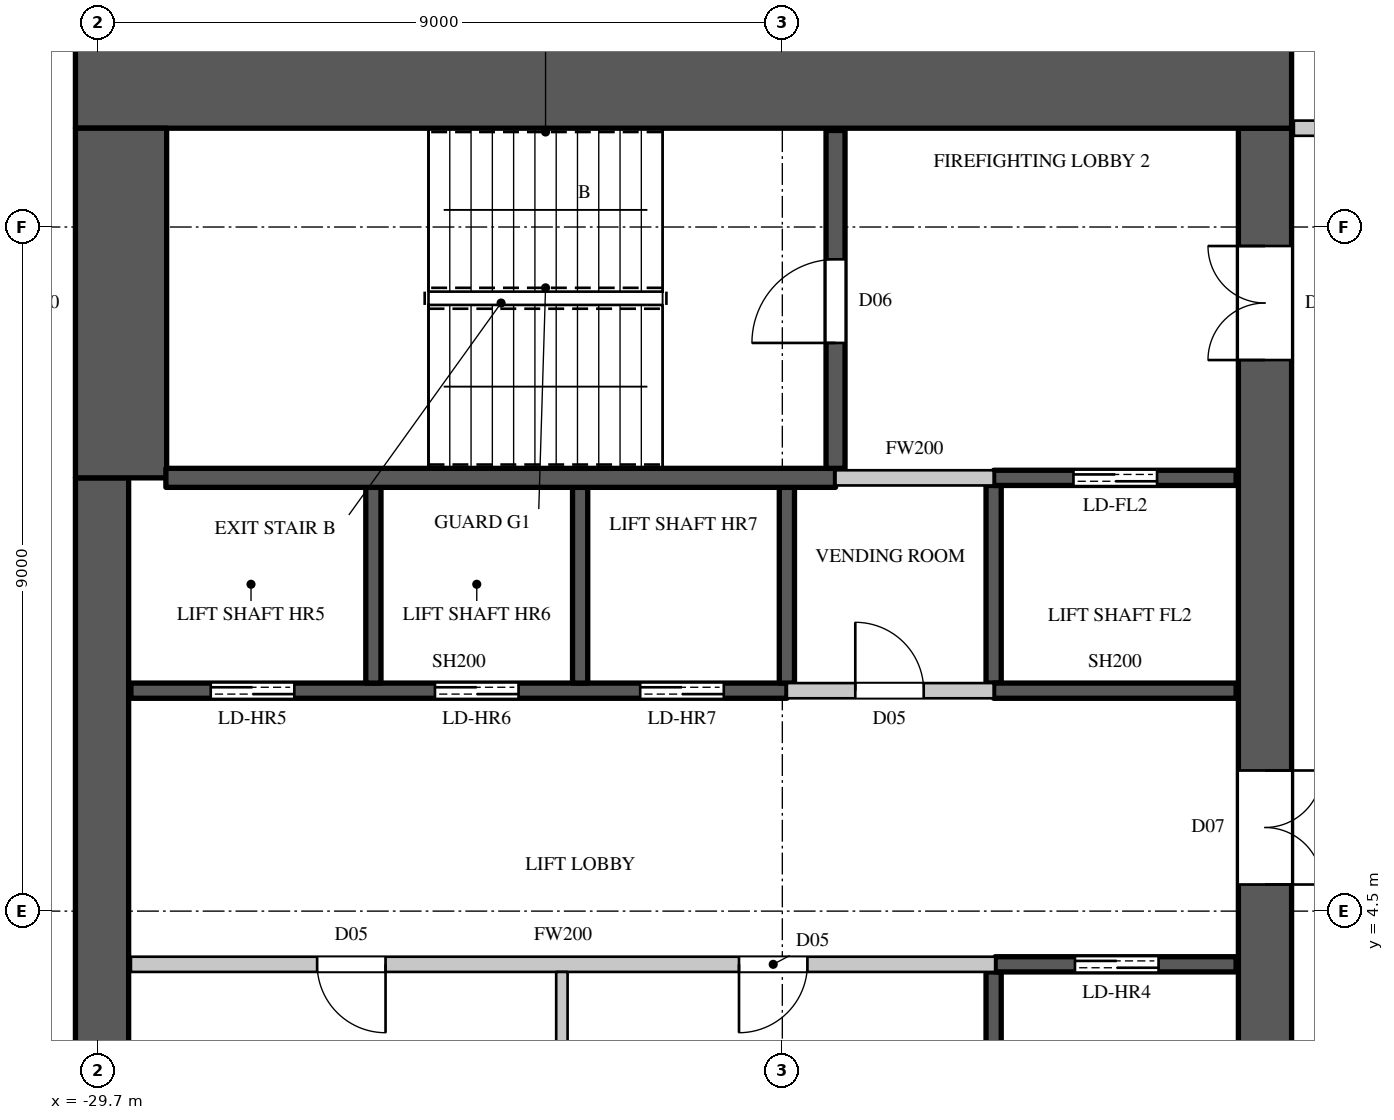
"""IFC4 building model, lengths in metres.
Left out: names, types, materials, properties, quantities, classifications, styles, units other than length and angle.
Written with IfcOpenShell. Run it as: python <this file> out.ifc"""

import sys

from ifc_helpers import new_model, si_unit, direction, frame, frame_2d, origin, place, context, subcontext, project, spatial, rectangle, extrude, element, fill, save


model = new_model("IFC4")
c1 = context("Model", 3, precision=1e-05, world=origin(), true_north=direction((0.0, 1.0)))
c2 = subcontext(c1, "Body", "Model", "MODEL_VIEW")
j1 = project(units=[si_unit("LENGTHUNIT", "METRE"), si_unit("PLANEANGLEUNIT", "RADIAN")], contexts=[c1])
p1 = place(None, origin())
s1 = spatial("IfcSite", under=j1, at=p1, CompositionType="ELEMENT")
p2 = place(p1, origin())
s2 = spatial("IfcBuilding", under=s1, at=p2, CompositionType="ELEMENT")
p3 = place(p2, frame((0.0, 0.0, 309.0)))
s3 = spatial("IfcBuildingStorey", under=s2, at=p3, CompositionType="ELEMENT", Elevation=309.0)
p4 = place(p3, frame((-30.0, 15.4, 0.0), z_axis=(0.0, 0.0, 1.0), x_axis=(1.0, 0.0, 0.0)))
e1 = element("IfcWall", 1, at=p4, inside=s3, PredefinedType="SHEAR", context=c2, shape_type="SweptSolid", body=[
    extrude(rectangle(XDim=16.0, YDim=1.2, at=frame_2d((8.0, 0.0))), origin(), (0.0, 0.0, 1.0), 4.1),
])
p5 = place(p3, frame((-14.35, -14.8, 0.0), z_axis=(0.0, 0.0, 1.0), x_axis=(0.0, 1.0, 0.0)))
e2 = element("IfcWall", 2, at=p5, inside=s3, PredefinedType="SHEAR", context=c2, shape_type="SweptSolid", body=[
    extrude(rectangle(XDim=29.6, YDim=0.7, at=frame_2d((14.8, 0.0))), origin(), (0.0, 0.0, 1.0), 4.1),
])
p6 = place(p5, frame((1.55, 0.0, 0.0)))
e3 = element("IfcOpeningElement", 3, at=p6, cuts=e2, PredefinedType="OPENING", context=c2, shape_type="SweptSolid", body=[
    extrude(rectangle(XDim=1.5, YDim=2.4, at=frame_2d((0.75, 1.2))), frame((0.0, 0.36, 0.0), z_axis=(0.0, -1.0, 0.0), x_axis=(1.0, 0.0, 0.0)), (0.0, 0.0, 1.0), 0.72),
])
p7 = place(p5, frame((26.55, 0.0, 0.0)))
e4 = element("IfcOpeningElement", 4, at=p7, cuts=e2, PredefinedType="OPENING", context=c2, shape_type="SweptSolid", body=[
    extrude(rectangle(XDim=1.5, YDim=2.4, at=frame_2d((0.75, 1.2))), frame((0.0, 0.36, 0.0), z_axis=(0.0, -1.0, 0.0), x_axis=(1.0, 0.0, 0.0)), (0.0, 0.0, 1.0), 0.72),
])
p8 = place(p5, frame((8.45, 0.0, 0.0)))
e5 = element("IfcOpeningElement", 5, at=p8, cuts=e2, PredefinedType="OPENING", context=c2, shape_type="SweptSolid", body=[
    extrude(rectangle(XDim=1.5, YDim=2.4, at=frame_2d((0.75, 1.2))), frame((0.0, 0.36, 0.0), z_axis=(0.0, -1.0, 0.0), x_axis=(1.0, 0.0, 0.0)), (0.0, 0.0, 1.0), 0.72),
])
p9 = place(p5, frame((19.65, 0.0, 0.0)))
e6 = element("IfcOpeningElement", 6, at=p9, cuts=e2, PredefinedType="OPENING", context=c2, shape_type="SweptSolid", body=[
    extrude(rectangle(XDim=1.5, YDim=2.4, at=frame_2d((0.75, 1.2))), frame((0.0, 0.36, 0.0), z_axis=(0.0, -1.0, 0.0), x_axis=(1.0, 0.0, 0.0)), (0.0, 0.0, 1.0), 0.72),
])
p10 = place(p5, frame((14.5, 0.0, 0.0)))
e7 = element("IfcOpeningElement", 7, at=p10, cuts=e2, PredefinedType="OPENING", context=c2, shape_type="SweptSolid", body=[
    extrude(rectangle(XDim=0.6, YDim=2.0, at=frame_2d((0.3, 1.0))), frame((0.0, 0.36, 0.0), z_axis=(0.0, -1.0, 0.0), x_axis=(1.0, 0.0, 0.0)), (0.0, 0.0, 1.0), 0.72),
])
p11 = place(p3, frame((-29.65, -10.2, 0.0), z_axis=(0.0, 0.0, 1.0), x_axis=(0.0, 1.0, 0.0)))
e8 = element("IfcWall", 8, at=p11, inside=s3, PredefinedType="SHEAR", context=c2, shape_type="SweptSolid", body=[
    extrude(rectangle(XDim=20.4, YDim=0.7, at=frame_2d((10.2, 0.0))), origin(), (0.0, 0.0, 1.0), 4.1),
])
p12 = place(p3, frame((-29.4, 10.2, 0.0), z_axis=(0.0, 0.0, 1.0), x_axis=(0.0, 1.0, 0.0)))
e9 = element("IfcWall", 9, at=p12, inside=s3, PredefinedType="SHEAR", context=c2, shape_type="SweptSolid", body=[
    extrude(rectangle(XDim=4.6, YDim=1.2, at=frame_2d((2.3, 0.0))), origin(), (0.0, 0.0, 1.0), 4.1),
])
p13 = place(p3, frame((-29.27, 3.8, 0.0), z_axis=(0.0, 0.0, 1.0), x_axis=(1.0, 0.0, 0.0)))
e10 = element("IfcWall", 10, at=p13, inside=s3, PredefinedType="PARTITIONING", context=c2, shape_type="SweptSolid", body=[
    extrude(rectangle(XDim=11.37, YDim=0.2, at=frame_2d((5.685, 0.0))), origin(), (0.0, 0.0, 1.0), 3.8),
])
p14 = place(p13, frame((2.45, 0.0, 0.0)))
e11 = element("IfcOpeningElement", 11, at=p14, cuts=e10, PredefinedType="OPENING", context=c2, shape_type="SweptSolid", body=[
    extrude(rectangle(XDim=0.9, YDim=2.2, at=frame_2d((0.45, 1.1))), frame((0.0, 0.11, 0.0), z_axis=(0.0, -1.0, 0.0), x_axis=(1.0, 0.0, 0.0)), (0.0, 0.0, 1.0), 0.22),
])
p15 = place(p13, frame((8.0, 0.0, 0.0)))
e12 = element("IfcOpeningElement", 12, at=p15, cuts=e10, PredefinedType="OPENING", context=c2, shape_type="SweptSolid", body=[
    extrude(rectangle(XDim=0.9, YDim=2.2, at=frame_2d((0.45, 1.1))), frame((0.0, 0.11, 0.0), z_axis=(0.0, -1.0, 0.0), x_axis=(1.0, 0.0, 0.0)), (0.0, 0.0, 1.0), 0.22),
])
p16 = place(p3, frame((-20.64, 7.4, 0.0), z_axis=(0.0, 0.0, 1.0), x_axis=(1.0, 0.0, 0.0)))
e13 = element("IfcWall", 13, at=p16, inside=s3, PredefinedType="PARTITIONING", context=c2, shape_type="SweptSolid", body=[
    extrude(rectangle(XDim=2.72, YDim=0.2, at=frame_2d((1.36, 0.0))), origin(), (0.0, 0.0, 1.0), 3.8),
])
p17 = place(p16, frame((0.9, 0.0, 0.0)))
e14 = element("IfcOpeningElement", 14, at=p17, cuts=e13, PredefinedType="OPENING", context=c2, shape_type="SweptSolid", body=[
    extrude(rectangle(XDim=0.9, YDim=2.2, at=frame_2d((0.45, 1.1))), frame((0.0, 0.11, 0.0), z_axis=(0.0, -1.0, 0.0), x_axis=(1.0, 0.0, 0.0)), (0.0, 0.0, 1.0), 0.22),
])
p18 = place(p3, frame((-20.0, 10.2, 0.0), z_axis=(0.0, 0.0, 1.0), x_axis=(1.0, 0.0, 0.0)))
e15 = element("IfcWall", 15, at=p18, inside=s3, PredefinedType="PARTITIONING", context=c2, shape_type="SweptSolid", body=[
    extrude(rectangle(XDim=2.08, YDim=0.2, at=frame_2d((1.04, 0.0))), origin(), (0.0, 0.0, 1.0), 3.8),
])
p19 = place(p3, frame((-13.97, 14.8, 0.0), z_axis=(0.0, 0.0, 1.0), x_axis=(1.0, 0.0, 0.0)))
e16 = element("IfcWall", 16, at=p19, inside=s3, PredefinedType="PARTITIONING", context=c2, shape_type="SweptSolid", body=[
    extrude(rectangle(XDim=3.07, YDim=0.2, at=frame_2d((1.535, 0.0))), origin(), (0.0, 0.0, 1.0), 3.8),
])
p20 = place(p3, frame((-23.6, 1.1, 0.0), z_axis=(0.0, 0.0, 1.0), x_axis=(0.0, 1.0, 0.0)))
e17 = element("IfcWall", 17, at=p20, inside=s3, PredefinedType="PARTITIONING", context=c2, shape_type="SweptSolid", body=[
    extrude(rectangle(XDim=2.6, YDim=0.15, at=frame_2d((1.3, 0.0))), origin(), (0.0, 0.0, 1.0), 3.8),
])
p21 = place(p3, frame((-29.27, 7.4, 0.0), z_axis=(0.0, 0.0, 1.0), x_axis=(1.0, 0.0, 0.0)))
e18 = element("IfcWall", 18, at=p21, inside=s3, PredefinedType="SHEAR", context=c2, shape_type="SweptSolid", body=[
    extrude(rectangle(XDim=8.63, YDim=0.2, at=frame_2d((4.315, 0.0))), origin(), (0.0, 0.0, 1.0), 3.8),
])
p22 = place(p21, frame((1.05, 0.0, 0.0)))
e19 = element("IfcOpeningElement", 19, at=p22, cuts=e18, PredefinedType="OPENING", context=c2, shape_type="SweptSolid", body=[
    extrude(rectangle(XDim=1.1, YDim=2.2, at=frame_2d((0.55, 1.1))), frame((0.0, 0.11, 0.0), z_axis=(0.0, -1.0, 0.0), x_axis=(1.0, 0.0, 0.0)), (0.0, 0.0, 1.0), 0.22),
])
p23 = place(p21, frame((4.0, 0.0, 0.0)))
e20 = element("IfcOpeningElement", 20, at=p23, cuts=e18, PredefinedType="OPENING", context=c2, shape_type="SweptSolid", body=[
    extrude(rectangle(XDim=1.1, YDim=2.2, at=frame_2d((0.55, 1.1))), frame((0.0, 0.11, 0.0), z_axis=(0.0, -1.0, 0.0), x_axis=(1.0, 0.0, 0.0)), (0.0, 0.0, 1.0), 0.22),
])
p24 = place(p21, frame((6.7, 0.0, 0.0)))
e21 = element("IfcOpeningElement", 21, at=p24, cuts=e18, PredefinedType="OPENING", context=c2, shape_type="SweptSolid", body=[
    extrude(rectangle(XDim=1.1, YDim=2.2, at=frame_2d((0.55, 1.1))), frame((0.0, 0.11, 0.0), z_axis=(0.0, -1.0, 0.0), x_axis=(1.0, 0.0, 0.0)), (0.0, 0.0, 1.0), 0.22),
])
for number, where, z_axis, x_axis in (
    (22, (-26.08, 7.5, 0.0), (0.0, 0.0, 1.0), (0.0, 1.0, 0.0)),
    (23, (-23.36, 7.5, 0.0), (0.0, 0.0, 1.0), (0.0, 1.0, 0.0)),
):
    element("IfcWall", number, at=place(p3, frame(where, z_axis=z_axis, x_axis=x_axis)), inside=s3, PredefinedType="SHEAR", context=c2, shape_type="SweptSolid", body=[
        extrude(rectangle(XDim=2.575, YDim=0.2, at=frame_2d((1.288, 0.0))), origin(), (0.0, 0.0, 1.0), 4.1),
    ])
p25 = place(p3, frame((-20.64, 7.5, 0.0), z_axis=(0.0, 0.0, 1.0), x_axis=(0.0, 1.0, 0.0)))
e24 = element("IfcWall", 24, at=p25, inside=s3, PredefinedType="SHEAR", context=c2, shape_type="SweptSolid", body=[
    extrude(rectangle(XDim=2.575, YDim=0.2, at=frame_2d((1.288, 0.0))), origin(), (0.0, 0.0, 1.0), 3.8),
])
p26 = place(p3, frame((-17.92, 1.1, 0.0), z_axis=(0.0, 0.0, 1.0), x_axis=(0.0, 1.0, 0.0)))
e25 = element("IfcWall", 25, at=p26, inside=s3, PredefinedType="SHEAR", context=c2, shape_type="SweptSolid", body=[
    extrude(rectangle(XDim=2.6, YDim=0.2, at=frame_2d((1.3, 0.0))), origin(), (0.0, 0.0, 1.0), 3.8),
])
p27 = place(p3, frame((-17.9, 3.8, 0.0), z_axis=(0.0, 0.0, 1.0), x_axis=(1.0, 0.0, 0.0)))
e26 = element("IfcWall", 26, at=p27, inside=s3, PredefinedType="SHEAR", context=c2, shape_type="SweptSolid", body=[
    extrude(rectangle(XDim=3.17, YDim=0.2, at=frame_2d((1.585, 0.0))), origin(), (0.0, 0.0, 1.0), 3.8),
])
p28 = place(p27, frame((1.05, 0.0, 0.0)))
e27 = element("IfcOpeningElement", 27, at=p28, cuts=e26, PredefinedType="OPENING", context=c2, shape_type="SweptSolid", body=[
    extrude(rectangle(XDim=1.1, YDim=2.2, at=frame_2d((0.55, 1.1))), frame((0.0, 0.11, 0.0), z_axis=(0.0, -1.0, 0.0), x_axis=(1.0, 0.0, 0.0)), (0.0, 0.0, 1.0), 0.22),
])
p29 = place(p3, frame((-17.92, 7.5, 0.0), z_axis=(0.0, 0.0, 1.0), x_axis=(0.0, 1.0, 0.0)))
e28 = element("IfcWall", 28, at=p29, inside=s3, PredefinedType="SHEAR", context=c2, shape_type="SweptSolid", body=[
    extrude(rectangle(XDim=2.6, YDim=0.2, at=frame_2d((1.3, 0.0))), origin(), (0.0, 0.0, 1.0), 3.8),
])
p30 = place(p3, frame((-17.92, 7.4, 0.0), z_axis=(0.0, 0.0, 1.0), x_axis=(1.0, 0.0, 0.0)))
e29 = element("IfcWall", 29, at=p30, inside=s3, PredefinedType="SHEAR", context=c2, shape_type="SweptSolid", body=[
    extrude(rectangle(XDim=3.19, YDim=0.2, at=frame_2d((1.595, 0.0))), origin(), (0.0, 0.0, 1.0), 3.8),
])
p31 = place(p3, frame((-17.92, 10.2, 0.0), z_axis=(0.0, 0.0, 1.0), x_axis=(1.0, 0.0, 0.0)))
e30 = element("IfcWall", 30, at=p31, inside=s3, PredefinedType="SHEAR", context=c2, shape_type="SweptSolid", body=[
    extrude(rectangle(XDim=3.19, YDim=0.2, at=frame_2d((1.595, 0.0))), origin(), (0.0, 0.0, 1.0), 3.8),
])
p32 = place(p31, frame((1.05, 0.0, 0.0)))
e31 = element("IfcOpeningElement", 31, at=p32, cuts=e30, PredefinedType="OPENING", context=c2, shape_type="SweptSolid", body=[
    extrude(rectangle(XDim=1.1, YDim=2.2, at=frame_2d((0.55, 1.1))), frame((0.0, 0.11, 0.0), z_axis=(0.0, -1.0, 0.0), x_axis=(1.0, 0.0, 0.0)), (0.0, 0.0, 1.0), 0.22),
])
p33 = place(p3, frame((-28.81, 10.2, 0.0), z_axis=(0.0, 0.0, 1.0), x_axis=(1.0, 0.0, 0.0)))
e32 = element("IfcWall", 32, at=p33, inside=s3, PredefinedType="SHEAR", context=c2, shape_type="SweptSolid", body=[
    extrude(rectangle(XDim=8.81, YDim=0.25, at=frame_2d((4.405, 0.0))), origin(), (0.0, 0.0, 1.0), 3.8),
])
p34 = place(p3, frame((-20.0, 10.325, 0.0), z_axis=(0.0, 0.0, 1.0), x_axis=(0.0, 1.0, 0.0)))
e33 = element("IfcWall", 33, at=p34, inside=s3, PredefinedType="SHEAR", context=c2, shape_type="SweptSolid", body=[
    extrude(rectangle(XDim=4.445, YDim=0.25, at=frame_2d((2.223, 0.0))), origin(), (0.0, 0.0, 1.0), 3.8),
])
p35 = place(p34, frame((1.65, 0.0, 0.0)))
e34 = element("IfcOpeningElement", 34, at=p35, cuts=e33, PredefinedType="OPENING", context=c2, shape_type="SweptSolid", body=[
    extrude(rectangle(XDim=1.1, YDim=2.2, at=frame_2d((0.55, 1.1))), frame((0.0, 0.135, 0.0), z_axis=(0.0, -1.0, 0.0), x_axis=(1.0, 0.0, 0.0)), (0.0, 0.0, 1.0), 0.27),
])
p36 = place(p35, origin())
e35 = element("IfcDoor", 35, at=p36, inside=s3, OperationType="SINGLE_SWING_LEFT", PredefinedType="DOOR", context=c2, shape_type="SweptSolid", body=[
    extrude(rectangle(XDim=1.1, YDim=2.2, at=frame_2d((0.55, 1.1))), frame((0.0, 0.025, 0.0), z_axis=(0.0, -1.0, 0.0), x_axis=(1.0, 0.0, 0.0)), (0.0, 0.0, 1.0), 0.05),
])
fill(e34, e35)
p37 = place(p14, origin())
e36 = element("IfcDoor", 36, at=p37, inside=s3, OperationType="SINGLE_SWING_LEFT", PredefinedType="DOOR", context=c2, shape_type="SweptSolid", body=[
    extrude(rectangle(XDim=0.9, YDim=2.2, at=frame_2d((0.45, 1.1))), frame((0.0, 0.025, 0.0), z_axis=(0.0, -1.0, 0.0), x_axis=(1.0, 0.0, 0.0)), (0.0, 0.0, 1.0), 0.05),
])
fill(e11, e36)
p38 = place(p15, origin())
e37 = element("IfcDoor", 37, at=p38, inside=s3, OperationType="SINGLE_SWING_RIGHT", PredefinedType="DOOR", context=c2, shape_type="SweptSolid", body=[
    extrude(rectangle(XDim=0.9, YDim=2.2, at=frame_2d((0.45, 1.1))), frame((0.0, 0.025, 0.0), z_axis=(0.0, -1.0, 0.0), x_axis=(1.0, 0.0, 0.0)), (0.0, 0.0, 1.0), 0.05),
])
fill(e12, e37)
p39 = place(p17, origin())
e38 = element("IfcDoor", 38, at=p39, inside=s3, OperationType="SINGLE_SWING_LEFT", PredefinedType="DOOR", context=c2, shape_type="SweptSolid", body=[
    extrude(rectangle(XDim=0.9, YDim=2.2, at=frame_2d((0.45, 1.1))), frame((0.0, 0.025, 0.0), z_axis=(0.0, -1.0, 0.0), x_axis=(1.0, 0.0, 0.0)), (0.0, 0.0, 1.0), 0.05),
])
fill(e14, e38)
p40 = place(p28, origin())
e39 = element("IfcDoor", 39, at=p40, inside=s3, OperationType="DOUBLE_DOOR_SLIDING", PredefinedType="DOOR", context=c2, shape_type="SweptSolid", body=[
    extrude(rectangle(XDim=1.1, YDim=2.2, at=frame_2d((0.55, 1.1))), frame((0.0, 0.025, 0.0), z_axis=(0.0, -1.0, 0.0), x_axis=(1.0, 0.0, 0.0)), (0.0, 0.0, 1.0), 0.05),
])
fill(e27, e39)
p41 = place(p22, origin())
e40 = element("IfcDoor", 40, at=p41, inside=s3, OperationType="DOUBLE_DOOR_SLIDING", PredefinedType="DOOR", context=c2, shape_type="SweptSolid", body=[
    extrude(rectangle(XDim=1.1, YDim=2.2, at=frame_2d((0.55, 1.1))), frame((0.0, 0.025, 0.0), z_axis=(0.0, -1.0, 0.0), x_axis=(1.0, 0.0, 0.0)), (0.0, 0.0, 1.0), 0.05),
])
fill(e19, e40)
p42 = place(p23, origin())
e41 = element("IfcDoor", 41, at=p42, inside=s3, OperationType="DOUBLE_DOOR_SLIDING", PredefinedType="DOOR", context=c2, shape_type="SweptSolid", body=[
    extrude(rectangle(XDim=1.1, YDim=2.2, at=frame_2d((0.55, 1.1))), frame((0.0, 0.025, 0.0), z_axis=(0.0, -1.0, 0.0), x_axis=(1.0, 0.0, 0.0)), (0.0, 0.0, 1.0), 0.05),
])
fill(e20, e41)
p43 = place(p24, origin())
e42 = element("IfcDoor", 42, at=p43, inside=s3, OperationType="DOUBLE_DOOR_SLIDING", PredefinedType="DOOR", context=c2, shape_type="SweptSolid", body=[
    extrude(rectangle(XDim=1.1, YDim=2.2, at=frame_2d((0.55, 1.1))), frame((0.0, 0.025, 0.0), z_axis=(0.0, -1.0, 0.0), x_axis=(1.0, 0.0, 0.0)), (0.0, 0.0, 1.0), 0.05),
])
fill(e21, e42)
p44 = place(p32, origin())
e43 = element("IfcDoor", 43, at=p44, inside=s3, OperationType="DOUBLE_DOOR_SLIDING", PredefinedType="DOOR", context=c2, shape_type="SweptSolid", body=[
    extrude(rectangle(XDim=1.1, YDim=2.2, at=frame_2d((0.55, 1.1))), frame((0.0, 0.025, 0.0), z_axis=(0.0, -1.0, 0.0), x_axis=(1.0, 0.0, 0.0)), (0.0, 0.0, 1.0), 0.05),
])
fill(e31, e43)
p45 = place(p7, origin())
e44 = element("IfcDoor", 44, at=p45, inside=s3, OperationType="DOUBLE_DOOR_SINGLE_SWING", PredefinedType="DOOR", context=c2, shape_type="SweptSolid", body=[
    extrude(rectangle(XDim=1.5, YDim=2.4, at=frame_2d((0.75, 1.2))), frame((0.0, 0.345, 0.0), z_axis=(0.0, -1.0, 0.0), x_axis=(1.0, 0.0, 0.0)), (0.0, 0.0, 1.0), 0.05),
])
fill(e4, e44)
p46 = place(p9, origin())
e45 = element("IfcDoor", 45, at=p46, inside=s3, OperationType="DOUBLE_DOOR_SINGLE_SWING", PredefinedType="DOOR", context=c2, shape_type="SweptSolid", body=[
    extrude(rectangle(XDim=1.5, YDim=2.4, at=frame_2d((0.75, 1.2))), frame((0.0, -0.295, 0.0), z_axis=(0.0, -1.0, 0.0), x_axis=(1.0, 0.0, 0.0)), (0.0, 0.0, 1.0), 0.05),
])
fill(e6, e45)
save(model, sys.argv[1])
